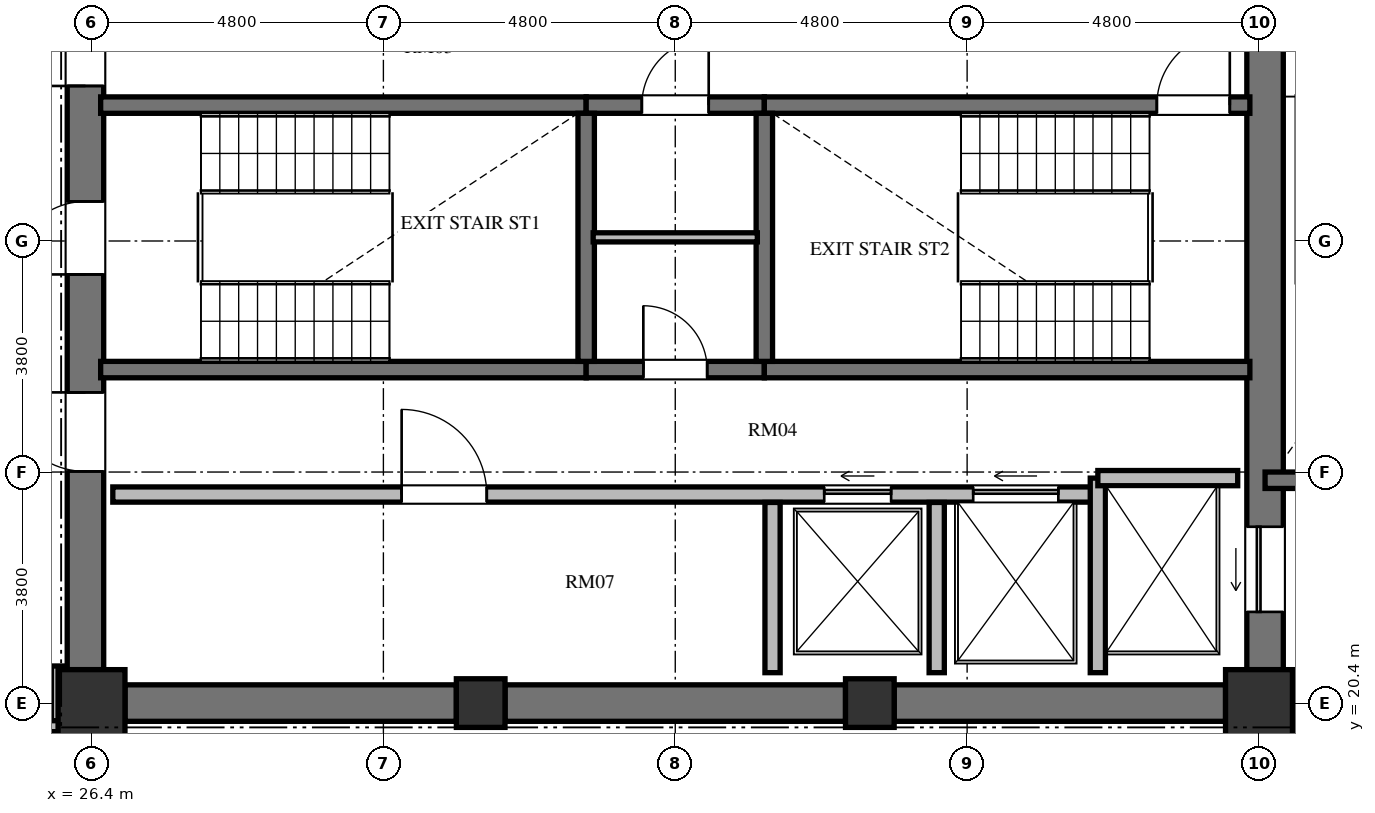
"""IFC4 building model, lengths in metres.
Left out: names, types, materials, properties, quantities, classifications, styles, units other than length and angle.
Written with IfcOpenShell. Run it as: python <this file> out.ifc"""

import sys

from ifc_helpers import new_model, si_unit, direction, frame, frame_2d, origin, origin_2d, place, context, subcontext, project, spatial, rectangle, extrude, element, fill, save


model = new_model("IFC4")
c1 = context("Model", 3, precision=1e-05, world=origin(), true_north=direction((0.0, 1.0)))
c2 = subcontext(c1, "Body", "Model", "MODEL_VIEW")
j1 = project(units=[si_unit("LENGTHUNIT", "METRE"), si_unit("PLANEANGLEUNIT", "RADIAN")], contexts=[c1])
p1 = place(None, origin())
s1 = spatial("IfcSite", under=j1, at=p1, CompositionType="ELEMENT")
p2 = place(p1, origin())
s2 = spatial("IfcBuilding", under=s1, at=p2, CompositionType="ELEMENT")
p3 = place(p2, frame((0.0, 0.0, 227.664)))
s3 = spatial("IfcBuildingStorey", under=s2, at=p3, CompositionType="ELEMENT", Elevation=227.664)
p4 = place(p3, frame((26.4, 20.4, 0.0), z_axis=(0.0, 0.0, 1.0), x_axis=(1.0, 0.0, 0.0)))
e1 = element("IfcColumn", 1, at=p4, inside=s3, PredefinedType="COLUMN", context=c2, shape_type="SweptSolid", body=[
    extrude(rectangle(XDim=1.1, YDim=1.1, at=origin_2d()), origin(), (0.0, 0.0, 1.0), 3.648),
])
for number, where, z_axis, x_axis in (
    (2, (32.8, 20.4, 0.0), (0.0, 0.0, 1.0), (1.0, 0.0, 0.0)),
    (3, (39.2, 20.4, 0.0), (0.0, 0.0, 1.0), (1.0, 0.0, 0.0)),
):
    element("IfcColumn", number, at=place(p3, frame(where, z_axis=z_axis, x_axis=x_axis)), inside=s3, PredefinedType="COLUMN", context=c2, shape_type="SweptSolid", body=[
        extrude(rectangle(XDim=0.8, YDim=0.8, at=origin_2d()), origin(), (0.0, 0.0, 1.0), 3.648),
    ])
p5 = place(p3, frame((45.6, 20.4, 0.0), z_axis=(0.0, 0.0, 1.0), x_axis=(1.0, 0.0, 0.0)))
e4 = element("IfcColumn", 4, at=p5, inside=s3, PredefinedType="COLUMN", context=c2, shape_type="SweptSolid", body=[
    extrude(rectangle(XDim=1.1, YDim=1.1, at=origin_2d()), origin(), (0.0, 0.0, 1.0), 3.648),
])
p6 = place(p3, frame((26.3, 20.95, 0.0), z_axis=(0.0, 0.0, 1.0), x_axis=(0.0, 1.0, 0.0)))
e5 = element("IfcWall", 5, at=p6, inside=s3, PredefinedType="SHEAR", context=c2, shape_type="SweptSolid", body=[
    extrude(rectangle(XDim=14.1, YDim=0.6, at=frame_2d((7.05, 0.0))), origin(), (0.0, 0.0, 1.0), 3.648),
])
p7 = place(p6, frame((6.5, 0.0, 0.0)))
e6 = element("IfcOpeningElement", 6, at=p7, cuts=e5, PredefinedType="OPENING", context=c2, shape_type="SweptSolid", body=[
    extrude(rectangle(XDim=1.2, YDim=2.15, at=frame_2d((0.6, 1.075))), frame((0.0, 0.31, 0.0), z_axis=(0.0, -1.0, 0.0), x_axis=(1.0, 0.0, 0.0)), (0.0, 0.0, 1.0), 0.62),
])
p8 = place(p6, frame((9.6, 0.0, 0.0)))
e7 = element("IfcOpeningElement", 7, at=p8, cuts=e5, PredefinedType="OPENING", context=c2, shape_type="SweptSolid", body=[
    extrude(rectangle(XDim=1.3, YDim=2.2, at=frame_2d((0.65, 1.1))), frame((0.0, 0.31, 0.0), z_axis=(0.0, -1.0, 0.0), x_axis=(1.0, 0.0, 0.0)), (0.0, 0.0, 1.0), 0.62),
])
p9 = place(p6, frame((3.26, 0.0, 0.0)))
e8 = element("IfcOpeningElement", 8, at=p9, cuts=e5, PredefinedType="OPENING", context=c2, shape_type="SweptSolid", body=[
    extrude(rectangle(XDim=1.3, YDim=2.2, at=frame_2d((0.65, 1.1))), frame((0.0, 0.31, 0.0), z_axis=(0.0, -1.0, 0.0), x_axis=(1.0, 0.0, 0.0)), (0.0, 0.0, 1.0), 0.62),
])
p10 = place(p3, frame((45.7, 20.95, 0.0), z_axis=(0.0, 0.0, 1.0), x_axis=(0.0, 1.0, 0.0)))
e9 = element("IfcWall", 9, at=p10, inside=s3, PredefinedType="SHEAR", context=c2, shape_type="SweptSolid", body=[
    extrude(rectangle(XDim=14.1, YDim=0.6, at=frame_2d((7.05, 0.0))), origin(), (0.0, 0.0, 1.0), 3.648),
])
p11 = place(p10, frame((11.75, 0.0, 0.0)))
e10 = element("IfcOpeningElement", 10, at=p11, cuts=e9, PredefinedType="OPENING", context=c2, shape_type="SweptSolid", body=[
    extrude(rectangle(XDim=1.4, YDim=2.3, at=frame_2d((0.7, 1.15))), frame((0.0, 0.31, 0.0), z_axis=(0.0, -1.0, 0.0), x_axis=(1.0, 0.0, 0.0)), (0.0, 0.0, 1.0), 0.62),
])
p12 = place(p10, frame((0.95, 0.0, 0.0)))
e11 = element("IfcOpeningElement", 11, at=p12, cuts=e9, PredefinedType="OPENING", context=c2, shape_type="SweptSolid", body=[
    extrude(rectangle(XDim=1.4, YDim=2.3, at=frame_2d((0.7, 1.15))), frame((0.0, 0.31, 0.0), z_axis=(0.0, -1.0, 0.0), x_axis=(1.0, 0.0, 0.0)), (0.0, 0.0, 1.0), 0.62),
])
p13 = place(p3, frame((26.95, 20.4, 0.0), z_axis=(0.0, 0.0, 1.0), x_axis=(1.0, 0.0, 0.0)))
e12 = element("IfcWall", 12, at=p13, inside=s3, PredefinedType="SHEAR", context=c2, shape_type="SweptSolid", body=[
    extrude(rectangle(XDim=5.45, YDim=0.6, at=frame_2d((2.725, 0.0))), origin(), (0.0, 0.0, 1.0), 3.648),
])
p14 = place(p3, frame((33.2, 20.4, 0.0), z_axis=(0.0, 0.0, 1.0), x_axis=(1.0, 0.0, 0.0)))
e13 = element("IfcWall", 13, at=p14, inside=s3, PredefinedType="SHEAR", context=c2, shape_type="SweptSolid", body=[
    extrude(rectangle(XDim=5.6, YDim=0.6, at=frame_2d((2.8, 0.0))), origin(), (0.0, 0.0, 1.0), 3.648),
])
p15 = place(p3, frame((39.6, 20.4, 0.0), z_axis=(0.0, 0.0, 1.0), x_axis=(1.0, 0.0, 0.0)))
e14 = element("IfcWall", 14, at=p15, inside=s3, PredefinedType="SHEAR", context=c2, shape_type="SweptSolid", body=[
    extrude(rectangle(XDim=5.45, YDim=0.6, at=frame_2d((2.725, 0.0))), origin(), (0.0, 0.0, 1.0), 3.648),
])
p16 = place(p3, frame((26.55, 30.235, 0.0), z_axis=(0.0, 0.0, 1.0), x_axis=(1.0, 0.0, 0.0)))
e15 = element("IfcWall", 15, at=p16, inside=s3, PredefinedType="SHEAR", context=c2, shape_type="SweptSolid", body=[
    extrude(rectangle(XDim=7.985, YDim=0.27, at=frame_2d((3.992, 0.0))), origin(), (0.0, 0.0, 1.0), 3.648),
])
p17 = place(p3, frame((34.535, 30.235, 0.0), z_axis=(0.0, 0.0, 1.0), x_axis=(1.0, 0.0, 0.0)))
e16 = element("IfcWall", 16, at=p17, inside=s3, PredefinedType="SHEAR", context=c2, shape_type="SweptSolid", body=[
    extrude(rectangle(XDim=2.93, YDim=0.27, at=frame_2d((1.465, 0.0))), origin(), (0.0, 0.0, 1.0), 3.648),
])
p18 = place(p17, frame((0.915, 0.0, 0.0)))
e17 = element("IfcOpeningElement", 17, at=p18, cuts=e16, PredefinedType="OPENING", context=c2, shape_type="SweptSolid", body=[
    extrude(rectangle(XDim=1.1, YDim=2.15, at=frame_2d((0.55, 1.075))), frame((0.0, 0.145, 0.0), z_axis=(0.0, -1.0, 0.0), x_axis=(1.0, 0.0, 0.0)), (0.0, 0.0, 1.0), 0.29),
])
p19 = place(p3, frame((37.465, 30.235, 0.0), z_axis=(0.0, 0.0, 1.0), x_axis=(1.0, 0.0, 0.0)))
e18 = element("IfcWall", 18, at=p19, inside=s3, PredefinedType="SHEAR", context=c2, shape_type="SweptSolid", body=[
    extrude(rectangle(XDim=7.985, YDim=0.27, at=frame_2d((3.992, 0.0))), origin(), (0.0, 0.0, 1.0), 3.648),
])
p20 = place(p19, frame((6.455, 0.0, 0.0)))
e19 = element("IfcOpeningElement", 19, at=p20, cuts=e18, PredefinedType="OPENING", context=c2, shape_type="SweptSolid", body=[
    extrude(rectangle(XDim=1.2, YDim=2.15, at=frame_2d((0.6, 1.075))), frame((0.0, 0.145, 0.0), z_axis=(0.0, -1.0, 0.0), x_axis=(1.0, 0.0, 0.0)), (0.0, 0.0, 1.0), 0.29),
])
p21 = place(p3, frame((26.55, 25.885, 0.0), z_axis=(0.0, 0.0, 1.0), x_axis=(1.0, 0.0, 0.0)))
e20 = element("IfcWall", 20, at=p21, inside=s3, PredefinedType="SHEAR", context=c2, shape_type="SweptSolid", body=[
    extrude(rectangle(XDim=7.985, YDim=0.27, at=frame_2d((3.992, 0.0))), origin(), (0.0, 0.0, 1.0), 3.648),
])
p22 = place(p3, frame((34.535, 25.885, 0.0), z_axis=(0.0, 0.0, 1.0), x_axis=(1.0, 0.0, 0.0)))
e21 = element("IfcWall", 21, at=p22, inside=s3, PredefinedType="SHEAR", context=c2, shape_type="SweptSolid", body=[
    extrude(rectangle(XDim=2.93, YDim=0.27, at=frame_2d((1.465, 0.0))), origin(), (0.0, 0.0, 1.0), 3.648),
])
p23 = place(p22, frame((0.94, 0.0, 0.0)))
e22 = element("IfcOpeningElement", 22, at=p23, cuts=e21, PredefinedType="OPENING", context=c2, shape_type="SweptSolid", body=[
    extrude(rectangle(XDim=1.05, YDim=2.15, at=frame_2d((0.525, 1.075))), frame((0.0, 0.145, 0.0), z_axis=(0.0, -1.0, 0.0), x_axis=(1.0, 0.0, 0.0)), (0.0, 0.0, 1.0), 0.29),
])
p24 = place(p3, frame((37.465, 25.885, 0.0), z_axis=(0.0, 0.0, 1.0), x_axis=(1.0, 0.0, 0.0)))
e23 = element("IfcWall", 23, at=p24, inside=s3, PredefinedType="SHEAR", context=c2, shape_type="SweptSolid", body=[
    extrude(rectangle(XDim=7.985, YDim=0.27, at=frame_2d((3.992, 0.0))), origin(), (0.0, 0.0, 1.0), 3.648),
])
for number, where, z_axis, x_axis in (
    (24, (34.535, 26.02, 0.0), (0.0, 0.0, 1.0), (0.0, 1.0, 0.0)),
    (25, (37.465, 26.02, 0.0), (0.0, 0.0, 1.0), (0.0, 1.0, 0.0)),
):
    element("IfcWall", number, at=place(p3, frame(where, z_axis=z_axis, x_axis=x_axis)), inside=s3, PredefinedType="SHEAR", context=c2, shape_type="SweptSolid", body=[
        extrude(rectangle(XDim=4.08, YDim=0.27, at=frame_2d((2.04, 0.0))), origin(), (0.0, 0.0, 1.0), 3.648),
    ])
p25 = place(p3, frame((34.65, 28.06, 0.0), z_axis=(0.0, 0.0, 1.0), x_axis=(1.0, 0.0, 0.0)))
e26 = element("IfcWall", 26, at=p25, inside=s3, PredefinedType="PARTITIONING", context=c2, shape_type="SweptSolid", body=[
    extrude(rectangle(XDim=2.7, YDim=0.15, at=frame_2d((1.35, 0.0))), origin(), (0.0, 0.0, 1.0), 3.448),
])
p26 = place(p3, frame((26.75, 23.83, 0.0), z_axis=(0.0, 0.0, 1.0), x_axis=(1.0, 0.0, 0.0)))
e27 = element("IfcWall", 27, at=p26, inside=s3, PredefinedType="SOLIDWALL", context=c2, shape_type="SweptSolid", body=[
    extrude(rectangle(XDim=16.2, YDim=0.25, at=frame_2d((8.1, 0.0))), origin(), (0.0, 0.0, 1.0), 3.448),
])
p27 = place(p26, frame((4.75, 0.0, 0.0)))
e28 = element("IfcOpeningElement", 28, at=p27, cuts=e27, PredefinedType="OPENING", context=c2, shape_type="SweptSolid", body=[
    extrude(rectangle(XDim=1.4, YDim=2.2, at=frame_2d((0.7, 1.1))), frame((0.0, 0.135, 0.0), z_axis=(0.0, -1.0, 0.0), x_axis=(1.0, 0.0, 0.0)), (0.0, 0.0, 1.0), 0.27),
])
p28 = place(p26, frame((11.7, 0.0, 0.0)))
e29 = element("IfcOpeningElement", 29, at=p28, cuts=e27, PredefinedType="OPENING", context=c2, shape_type="SweptSolid", body=[
    extrude(rectangle(XDim=1.1, YDim=2.2, at=frame_2d((0.55, 1.1))), frame((0.0, 0.135, 0.0), z_axis=(0.0, -1.0, 0.0), x_axis=(1.0, 0.0, 0.0)), (0.0, 0.0, 1.0), 0.27),
])
p29 = place(p26, frame((14.15, 0.0, 0.0)))
e30 = element("IfcOpeningElement", 30, at=p29, cuts=e27, PredefinedType="OPENING", context=c2, shape_type="SweptSolid", body=[
    extrude(rectangle(XDim=1.4, YDim=2.3, at=frame_2d((0.7, 1.15))), frame((0.0, 0.135, 0.0), z_axis=(0.0, -1.0, 0.0), x_axis=(1.0, 0.0, 0.0)), (0.0, 0.0, 1.0), 0.27),
])
p30 = place(p3, frame((42.95, 20.9, 0.0), z_axis=(0.0, 0.0, 1.0), x_axis=(0.0, 1.0, 0.0)))
e31 = element("IfcWall", 31, at=p30, inside=s3, PredefinedType="SOLIDWALL", context=c2, shape_type="SweptSolid", body=[
    extrude(rectangle(XDim=3.2, YDim=0.25, at=frame_2d((1.6, 0.0))), origin(), (0.0, 0.0, 1.0), 3.448),
])
p31 = place(p3, frame((42.95, 24.1, 0.0), z_axis=(0.0, 0.0, 1.0), x_axis=(1.0, 0.0, 0.0)))
e32 = element("IfcWall", 32, at=p31, inside=s3, PredefinedType="SOLIDWALL", context=c2, shape_type="SweptSolid", body=[
    extrude(rectangle(XDim=2.3, YDim=0.25, at=frame_2d((1.15, 0.0))), origin(), (0.0, 0.0, 1.0), 3.448),
])
for number, where, z_axis, x_axis in (
    (33, (37.6, 20.9, 0.0), (0.0, 0.0, 1.0), (0.0, 1.0, 0.0)),
    (34, (40.3, 20.9, 0.0), (0.0, 0.0, 1.0), (0.0, 1.0, 0.0)),
):
    element("IfcWall", number, at=place(p3, frame(where, z_axis=z_axis, x_axis=x_axis)), inside=s3, PredefinedType="SOLIDWALL", context=c2, shape_type="SweptSolid", body=[
        extrude(rectangle(XDim=2.8, YDim=0.25, at=frame_2d((1.4, 0.0))), origin(), (0.0, 0.0, 1.0), 3.448),
    ])
p32 = place(p3, frame((45.7, 24.065, 0.0), z_axis=(0.0, 0.0, 1.0), x_axis=(1.0, 0.0, 0.0)))
e35 = element("IfcWall", 35, at=p32, inside=s3, PredefinedType="SHEAR", context=c2, shape_type="SweptSolid", body=[
    extrude(rectangle(XDim=4.715, YDim=0.27, at=frame_2d((2.357, 0.0))), origin(), (0.0, 0.0, 1.0), 3.648),
])
p33 = place(p3, frame((45.7, 20.02, 0.0), z_axis=(0.0, 0.0, 1.0), x_axis=(1.0, 0.0, 0.0)))
e36 = element("IfcWall", 36, at=p33, inside=s3, PredefinedType="SOLIDWALL", context=c2, shape_type="SweptSolid", body=[
    extrude(rectangle(XDim=4.715, YDim=0.25, at=frame_2d((2.357, 0.0))), origin(), (0.0, 0.0, 1.0), 3.448),
])
p34 = place(p3, frame((25.83, 21.01, 0.0), z_axis=(0.0, 0.0, 1.0), x_axis=(0.0, -1.0, 0.0)))
e37 = element("IfcWall", 37, at=p34, inside=s3, PredefinedType="PARTITIONING", context=c2, shape_type="SweptSolid", body=[
    extrude(rectangle(XDim=1.03, YDim=0.18, at=frame_2d((0.515, 0.0))), origin(), (0.0, 0.0, 1.0), 3.448),
])
p35 = place(p3, frame((25.87, 20.02, 0.0), z_axis=(0.0, 0.0, 1.0), x_axis=(-1.0, 0.0, 0.0)))
e38 = element("IfcWall", 38, at=p35, inside=s3, PredefinedType="PARTITIONING", context=c2, shape_type="SweptSolid", body=[
    extrude(rectangle(XDim=2.56, YDim=0.18, at=frame_2d((1.28, 0.0))), origin(), (0.0, 0.0, 1.0), 3.448),
])
p36 = place(p7, origin())
e39 = element("IfcDoor", 39, at=p36, inside=s3, OperationType="SINGLE_SWING_LEFT", PredefinedType="DOOR", context=c2, shape_type="SweptSolid", body=[
    extrude(rectangle(XDim=1.2, YDim=2.15, at=frame_2d((0.6, 1.075))), frame((0.0, 0.025, 0.0), z_axis=(0.0, -1.0, 0.0), x_axis=(1.0, 0.0, 0.0)), (0.0, 0.0, 1.0), 0.05),
])
fill(e6, e39)
p37 = place(p20, origin())
e40 = element("IfcDoor", 40, at=p37, inside=s3, OperationType="SINGLE_SWING_RIGHT", PredefinedType="DOOR", context=c2, shape_type="SweptSolid", body=[
    extrude(rectangle(XDim=1.2, YDim=2.15, at=frame_2d((0.6, 1.075))), frame((0.0, 0.025, 0.0), z_axis=(0.0, -1.0, 0.0), x_axis=(1.0, 0.0, 0.0)), (0.0, 0.0, 1.0), 0.05),
])
fill(e19, e40)
p38 = place(p23, origin())
e41 = element("IfcDoor", 41, at=p38, inside=s3, OperationType="SINGLE_SWING_LEFT", PredefinedType="DOOR", context=c2, shape_type="SweptSolid", body=[
    extrude(rectangle(XDim=1.05, YDim=2.15, at=frame_2d((0.525, 1.075))), frame((0.0, 0.025, 0.0), z_axis=(0.0, -1.0, 0.0), x_axis=(1.0, 0.0, 0.0)), (0.0, 0.0, 1.0), 0.05),
])
fill(e22, e41)
p39 = place(p18, origin())
e42 = element("IfcDoor", 42, at=p39, inside=s3, OperationType="SINGLE_SWING_RIGHT", PredefinedType="DOOR", context=c2, shape_type="SweptSolid", body=[
    extrude(rectangle(XDim=1.1, YDim=2.15, at=frame_2d((0.55, 1.075))), frame((0.0, 0.025, 0.0), z_axis=(0.0, -1.0, 0.0), x_axis=(1.0, 0.0, 0.0)), (0.0, 0.0, 1.0), 0.05),
])
fill(e17, e42)
p40 = place(p8, origin())
e43 = element("IfcDoor", 43, at=p40, inside=s3, OperationType="SINGLE_SWING_LEFT", PredefinedType="DOOR", context=c2, shape_type="SweptSolid", body=[
    extrude(rectangle(XDim=1.3, YDim=2.2, at=frame_2d((0.65, 1.1))), frame((0.0, 0.025, 0.0), z_axis=(0.0, -1.0, 0.0), x_axis=(1.0, 0.0, 0.0)), (0.0, 0.0, 1.0), 0.05),
])
fill(e7, e43)
p41 = place(p9, origin())
e44 = element("IfcDoor", 44, at=p41, inside=s3, OperationType="SINGLE_SWING_RIGHT", PredefinedType="DOOR", context=c2, shape_type="SweptSolid", body=[
    extrude(rectangle(XDim=1.3, YDim=2.2, at=frame_2d((0.65, 1.1))), frame((0.0, 0.025, 0.0), z_axis=(0.0, -1.0, 0.0), x_axis=(1.0, 0.0, 0.0)), (0.0, 0.0, 1.0), 0.05),
])
fill(e8, e44)
p42 = place(p27, origin())
e45 = element("IfcDoor", 45, at=p42, inside=s3, OperationType="SINGLE_SWING_LEFT", PredefinedType="DOOR", context=c2, shape_type="SweptSolid", body=[
    extrude(rectangle(XDim=1.4, YDim=2.2, at=frame_2d((0.7, 1.1))), frame((0.0, 0.025, 0.0), z_axis=(0.0, -1.0, 0.0), x_axis=(1.0, 0.0, 0.0)), (0.0, 0.0, 1.0), 0.05),
])
fill(e28, e45)
p43 = place(p28, origin())
e46 = element("IfcDoor", 46, at=p43, inside=s3, OperationType="SLIDING_TO_LEFT", PredefinedType="DOOR", context=c2, shape_type="SweptSolid", body=[
    extrude(rectangle(XDim=1.1, YDim=2.2, at=frame_2d((0.55, 1.1))), frame((0.0, 0.025, 0.0), z_axis=(0.0, -1.0, 0.0), x_axis=(1.0, 0.0, 0.0)), (0.0, 0.0, 1.0), 0.05),
])
fill(e29, e46)
p44 = place(p12, origin())
e47 = element("IfcDoor", 47, at=p44, inside=s3, OperationType="SLIDING_TO_LEFT", PredefinedType="DOOR", context=c2, shape_type="SweptSolid", body=[
    extrude(rectangle(XDim=1.4, YDim=2.3, at=frame_2d((0.7, 1.15))), frame((0.0, 0.025, 0.0), z_axis=(0.0, -1.0, 0.0), x_axis=(1.0, 0.0, 0.0)), (0.0, 0.0, 1.0), 0.05),
])
fill(e11, e47)
p45 = place(p29, origin())
e48 = element("IfcDoor", 48, at=p45, inside=s3, OperationType="SLIDING_TO_LEFT", PredefinedType="DOOR", context=c2, shape_type="SweptSolid", body=[
    extrude(rectangle(XDim=1.4, YDim=2.3, at=frame_2d((0.7, 1.15))), frame((0.0, 0.025, 0.0), z_axis=(0.0, -1.0, 0.0), x_axis=(1.0, 0.0, 0.0)), (0.0, 0.0, 1.0), 0.05),
])
fill(e30, e48)
save(model, sys.argv[1])
